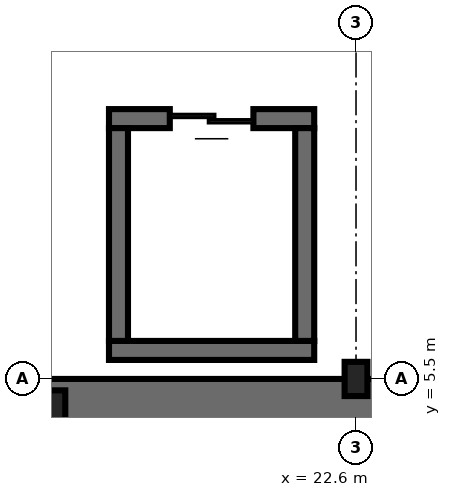
"""IFC4 building model, lengths in metres.
Left out: names, types, materials, properties, quantities, classifications, styles, units other than length and angle.
Written with IfcOpenShell. Run it as: python <this file> out.ifc"""

import sys

from ifc_helpers import new_model, si_unit, direction, frame, frame_2d, origin, origin_2d, place, context, subcontext, project, spatial, rectangle, i_section, extrude, element, fill, save


model = new_model("IFC4")
c1 = context("Model", 3, precision=1e-05, world=origin(), true_north=direction((0.0, 1.0)))
c2 = subcontext(c1, "Body", "Model", "MODEL_VIEW")
j1 = project(units=[si_unit("LENGTHUNIT", "METRE"), si_unit("PLANEANGLEUNIT", "RADIAN")], contexts=[c1])
p1 = place(None, origin())
s1 = spatial("IfcSite", under=j1, at=p1, CompositionType="ELEMENT")
p2 = place(p1, origin())
s2 = spatial("IfcBuilding", under=s1, at=p2, CompositionType="ELEMENT")
p3 = place(p2, frame((0.0, 0.0, -5.0)))
s3 = spatial("IfcBuildingStorey", under=s2, at=p3, CompositionType="ELEMENT", Elevation=-5.0)
p4 = place(p3, frame((18.6, 5.05, 0.0), z_axis=(0.0, 0.0, 1.0), x_axis=(1.0, 0.0, 0.0)))
e1 = element("IfcColumn", 1, at=p4, inside=s3, PredefinedType="PILASTER", context=c2, shape_type="SweptSolid", body=[
    extrude(rectangle(XDim=0.35, YDim=0.6, at=origin_2d()), origin(), (0.0, 0.0, 1.0), 5.0),
])
p5 = place(p3, frame((22.6, 5.5, 0.0), z_axis=(0.0, 0.0, 1.0), x_axis=(1.0, 0.0, 0.0)))
e2 = element("IfcColumn", 2, at=p5, inside=s3, PredefinedType="COLUMN", context=c2, shape_type="SweptSolid", body=[
    extrude(i_section(OverallWidth=0.3, OverallDepth=0.45, WebThickness=0.014, FlangeThickness=0.026, FilletRadius=0.027, at=origin_2d()), origin(), (0.0, 0.0, 1.0), 5.0),
])
p6 = place(p3, frame((19.35, 5.875, 0.0), z_axis=(0.0, 0.0, 1.0), x_axis=(1.0, 0.0, 0.0)))
e3 = element("IfcWall", 3, at=p6, inside=s3, PredefinedType="SHEAR", context=c2, shape_type="SweptSolid", body=[
    extrude(rectangle(XDim=2.7, YDim=0.25, at=frame_2d((1.35, 0.0))), origin(), (0.0, 0.0, 1.0), 5.0),
])
p7 = place(p3, frame((22.05, 8.925, 0.0), z_axis=(0.0, 0.0, 1.0), x_axis=(-1.0, 0.0, 0.0)))
e4 = element("IfcWall", 4, at=p7, inside=s3, PredefinedType="SHEAR", context=c2, shape_type="SweptSolid", body=[
    extrude(rectangle(XDim=2.7, YDim=0.25, at=frame_2d((1.35, 0.0))), origin(), (0.0, 0.0, 1.0), 5.0),
])
p8 = place(p7, frame((0.8, 0.0, 0.0)))
e5 = element("IfcOpeningElement", 5, at=p8, cuts=e4, PredefinedType="OPENING", context=c2, shape_type="SweptSolid", body=[
    extrude(rectangle(XDim=1.1, YDim=2.15, at=frame_2d((0.55, 1.075))), frame((0.0, 0.135, 0.0), z_axis=(0.0, -1.0, 0.0), x_axis=(1.0, 0.0, 0.0)), (0.0, 0.0, 1.0), 0.27),
])
for number, where, z_axis, x_axis in (
    (6, (19.475, 8.8, 0.0), (0.0, 0.0, 1.0), (0.0, -1.0, 0.0)),
    (7, (21.925, 6.0, 0.0), (0.0, 0.0, 1.0), (0.0, 1.0, 0.0)),
):
    element("IfcWall", number, at=place(p3, frame(where, z_axis=z_axis, x_axis=x_axis)), inside=s3, PredefinedType="SHEAR", context=c2, shape_type="SweptSolid", body=[
        extrude(rectangle(XDim=2.8, YDim=0.25, at=frame_2d((1.4, 0.0))), origin(), (0.0, 0.0, 1.0), 5.0),
    ])
p9 = place(p3, frame((6.182, 5.2, 0.0), z_axis=(0.0, 0.0, 1.0), x_axis=(1.0, 0.0, 0.0)))
e8 = element("IfcWall", 8, at=p9, inside=s3, PredefinedType="SHEAR", context=c2, shape_type="SweptSolid", body=[
    extrude(rectangle(XDim=47.736, YDim=0.6, at=frame_2d((23.868, 0.0))), origin(), (0.0, 0.0, 1.0), 4.7),
])
p10 = place(p8, origin())
e9 = element("IfcDoor", 9, at=p10, inside=s3, OperationType="DOUBLE_DOOR_SLIDING", PredefinedType="DOOR", context=c2, shape_type="SweptSolid", body=[
    extrude(rectangle(XDim=1.1, YDim=2.15, at=frame_2d((0.55, 1.075))), frame((0.0, 0.025, 0.0), z_axis=(0.0, -1.0, 0.0), x_axis=(1.0, 0.0, 0.0)), (0.0, 0.0, 1.0), 0.05),
])
fill(e5, e9)
save(model, sys.argv[1])
